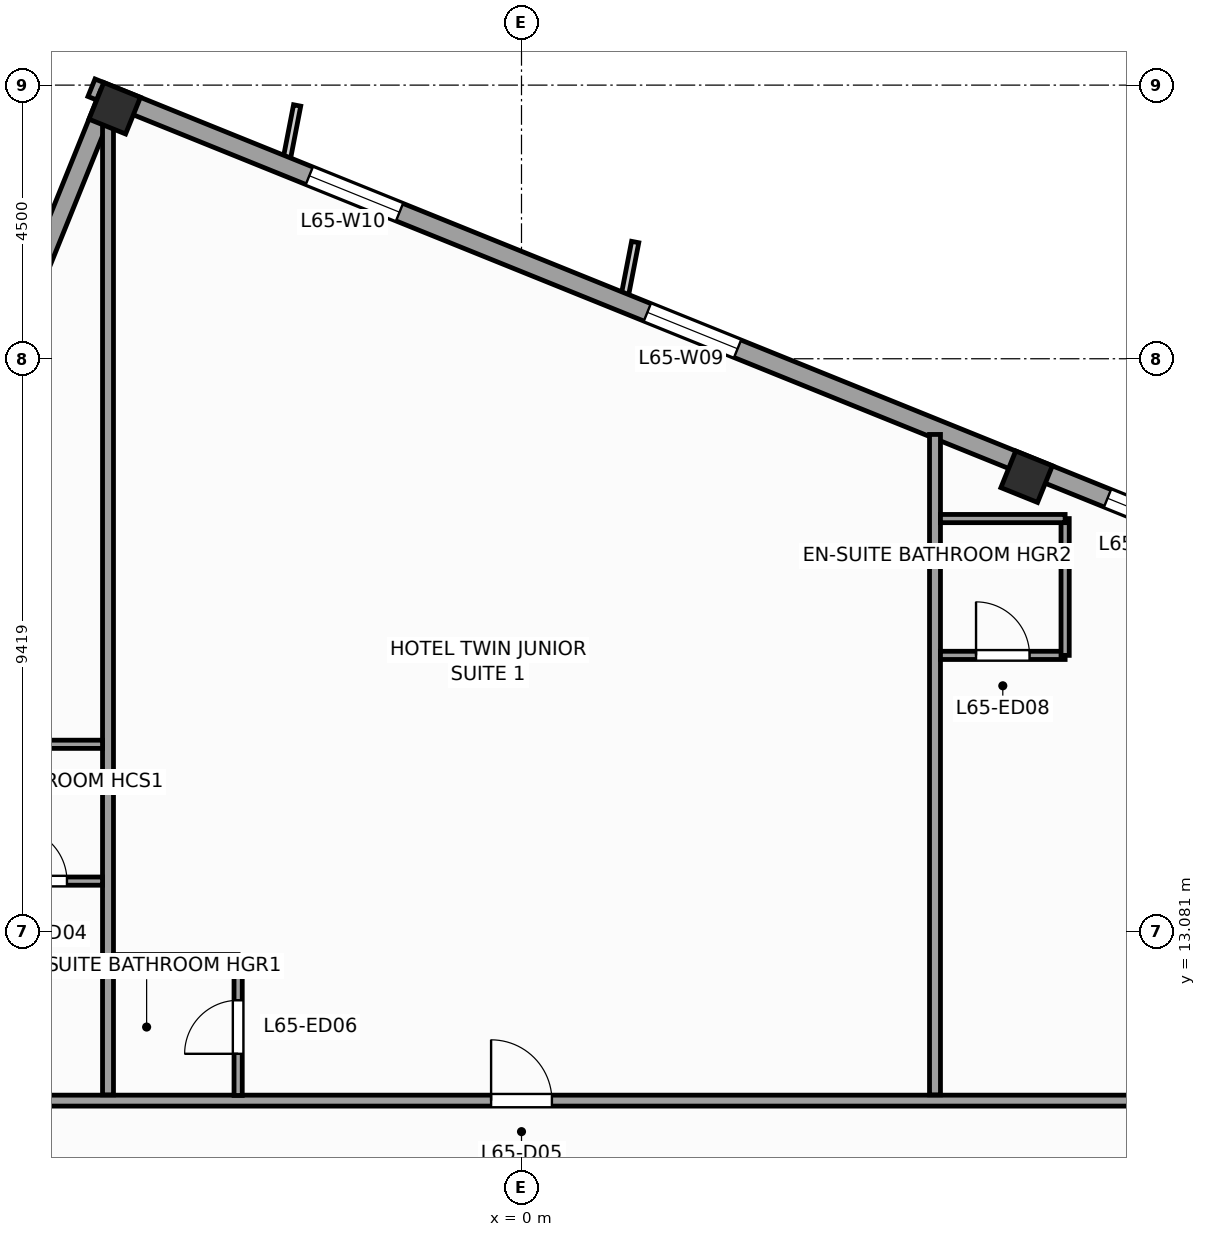
"""IFC4 building model, lengths in metres.
Left out: names, types, materials, properties, quantities, classifications, styles, units other than length and angle.
Written with IfcOpenShell. Run it as: python <this file> out.ifc"""

import sys

from ifc_helpers import new_model, si_unit, direction, frame, frame_2d, origin, origin_2d, place, context, subcontext, project, spatial, rectangle, extrude, source, transform, mapped, element, fill, save


model = new_model("IFC4")
c1 = context("Model", 3, precision=1e-05, world=origin(), true_north=direction((0.0, 1.0)))
c2 = subcontext(c1, "Body", "Model", "MODEL_VIEW")
j1 = project(units=[si_unit("LENGTHUNIT", "METRE"), si_unit("PLANEANGLEUNIT", "RADIAN")], contexts=[c1])
p1 = place(None, origin())
s1 = spatial("IfcSite", under=j1, at=p1, CompositionType="ELEMENT")
p2 = place(p1, origin())
s2 = spatial("IfcBuilding", under=s1, at=p2, CompositionType="ELEMENT")
p3 = place(p2, frame((0.0, 0.0, 268.8)))
s3 = spatial("IfcBuildingStorey", under=s2, at=p3, CompositionType="ELEMENT", Elevation=268.8)
m1 = source(origin(), c2, "Body", "SweptSolid", [
    extrude(rectangle(XDim=0.65, YDim=0.65, at=origin_2d()), origin(), (0.0, 0.0, 1.0), 3.6),
])
for number, where, z_axis, x_axis in (
    (1, (8.307, 20.56, 0.0), (0.0, 0.0, 1.0), (0.375, 0.927, 0.0)),
    (2, (-6.69, 26.62, 0.0), (0.0, 0.0, 1.0), (0.375, 0.927, 0.0)),
):
    element("IfcColumn", number, at=place(p3, frame(where, z_axis=z_axis, x_axis=x_axis)), inside=s3, PredefinedType="COLUMN", context=c2, shape_type="MappedRepresentation", body=[
        mapped(m1, transform((0.0, 0.0, 0.0), scale=1.0)),
    ])
p4 = place(p3, frame((23.813, 14.479, 0.0), z_axis=(0.0, 0.0, 1.0), x_axis=(-0.927182657188, 0.374609557019, 0.0)))
e3 = element("IfcWall", 3, at=p4, inside=s3, PredefinedType="STANDARD", context=c2, shape_type="SweptSolid", body=[
    extrude(rectangle(XDim=33.31, YDim=0.31, at=frame_2d((16.655, 0.0))), origin(), (0.0, 0.0, 1.0), 2.75),
])
p5 = place(p4, frame((3.197, 0.0, 0.47)))
e4 = element("IfcOpeningElement", 4, at=p5, cuts=e3, PredefinedType="OPENING", context=c2, shape_type="SweptSolid", body=[
    extrude(rectangle(XDim=1.6, YDim=2.1, at=frame_2d((0.8, 1.05))), frame((0.0, 0.165, 0.0), z_axis=(0.0, -1.0, 0.0), x_axis=(1.0, 0.0, 0.0)), (0.0, 0.0, 1.0), 0.33),
])
p6 = place(p4, frame((8.86, 0.0, 0.47)))
e5 = element("IfcOpeningElement", 5, at=p6, cuts=e3, PredefinedType="OPENING", context=c2, shape_type="SweptSolid", body=[
    extrude(rectangle(XDim=1.6, YDim=2.1, at=frame_2d((0.8, 1.05))), frame((0.0, 0.165, 0.0), z_axis=(0.0, -1.0, 0.0), x_axis=(1.0, 0.0, 0.0)), (0.0, 0.0, 1.0), 0.33),
])
p7 = place(p4, frame((13.689, 0.0, 0.47)))
e6 = element("IfcOpeningElement", 6, at=p7, cuts=e3, PredefinedType="OPENING", context=c2, shape_type="SweptSolid", body=[
    extrude(rectangle(XDim=1.6, YDim=2.1, at=frame_2d((0.8, 1.05))), frame((0.0, 0.165, 0.0), z_axis=(0.0, -1.0, 0.0), x_axis=(1.0, 0.0, 0.0)), (0.0, 0.0, 1.0), 0.33),
])
p8 = place(p4, frame((21.851, 0.0, 0.47)))
e7 = element("IfcOpeningElement", 7, at=p8, cuts=e3, PredefinedType="OPENING", context=c2, shape_type="SweptSolid", body=[
    extrude(rectangle(XDim=1.6, YDim=2.1, at=frame_2d((0.8, 1.05))), frame((0.0, 0.165, 0.0), z_axis=(0.0, -1.0, 0.0), x_axis=(1.0, 0.0, 0.0)), (0.0, 0.0, 1.0), 0.33),
])
p9 = place(p4, frame((27.847, 0.0, 0.47)))
e8 = element("IfcOpeningElement", 8, at=p9, cuts=e3, PredefinedType="OPENING", context=c2, shape_type="SweptSolid", body=[
    extrude(rectangle(XDim=1.6, YDim=2.1, at=frame_2d((0.8, 1.05))), frame((0.0, 0.165, 0.0), z_axis=(0.0, -1.0, 0.0), x_axis=(1.0, 0.0, 0.0)), (0.0, 0.0, 1.0), 0.33),
])
p10 = place(p3, frame((-6.784, 26.841, 0.0), z_axis=(0.0, 0.0, 1.0), x_axis=(-0.374636620962, -0.927171722085, 0.0)))
e9 = element("IfcWall", 9, at=p10, inside=s3, PredefinedType="STANDARD", context=c2, shape_type="SweptSolid", body=[
    extrude(rectangle(XDim=6.0, YDim=0.31, at=frame_2d((3.0, 0.0))), origin(), (0.0, 0.0, 1.0), 2.65),
])
p11 = place(p3, frame((-10.3, 10.3, 0.0), z_axis=(0.0, 0.0, 1.0), x_axis=(1.0, 0.0, 0.0)))
e10 = element("IfcWall", 10, at=p11, inside=s3, PredefinedType="PARTITIONING", context=c2, shape_type="SweptSolid", body=[
    extrude(rectangle(XDim=21.7, YDim=0.18, at=frame_2d((10.85, 0.0))), origin(), (0.0, 0.0, 1.0), 3.35),
])
p12 = place(p11, frame((9.8, 0.0, 0.0)))
e11 = element("IfcOpeningElement", 11, at=p12, cuts=e10, PredefinedType="OPENING", context=c2, shape_type="SweptSolid", body=[
    extrude(rectangle(XDim=1.0, YDim=2.15, at=frame_2d((0.5, 1.075))), frame((0.0, 0.1, 0.0), z_axis=(0.0, -1.0, 0.0), x_axis=(1.0, 0.0, 0.0)), (0.0, 0.0, 1.0), 0.2),
])
p13 = place(p3, frame((-6.8, 10.395, 0.0), z_axis=(0.0, 0.0, 1.0), x_axis=(0.0, 1.0, 0.0)))
e12 = element("IfcWall", 12, at=p13, inside=s3, PredefinedType="PARTITIONING", context=c2, shape_type="SweptSolid", body=[
    extrude(rectangle(XDim=16.167, YDim=0.18, at=frame_2d((8.083, 0.0))), origin(), (0.0, 0.0, 1.0), 3.35),
])
p14 = place(p3, frame((6.8, 10.395, 0.0), z_axis=(0.0, 0.0, 1.0), x_axis=(0.0, 1.0, 0.0)))
e13 = element("IfcWall", 13, at=p14, inside=s3, PredefinedType="PARTITIONING", context=c2, shape_type="SweptSolid", body=[
    extrude(rectangle(XDim=10.86, YDim=0.18, at=frame_2d((5.43, 0.0))), origin(), (0.0, 0.0, 1.0), 3.35),
])
p15 = place(p3, frame((-8.94, 13.91, 0.0), z_axis=(0.0, 0.0, 1.0), x_axis=(1.0, 0.0, 0.0)))
e14 = element("IfcWall", 14, at=p15, inside=s3, PredefinedType="PARTITIONING", context=c2, shape_type="SweptSolid", body=[
    extrude(rectangle(XDim=2.05, YDim=0.135, at=frame_2d((1.025, 0.0))), origin(), (0.0, 0.0, 1.0), 3.35),
])
p16 = place(p15, frame((0.585, 0.0, 0.0)))
e15 = element("IfcOpeningElement", 15, at=p16, cuts=e14, PredefinedType="OPENING", context=c2, shape_type="SweptSolid", body=[
    extrude(rectangle(XDim=0.88, YDim=2.1, at=frame_2d((0.44, 1.05))), frame((0.0, 0.078, 0.0), z_axis=(0.0, -1.0, 0.0), x_axis=(1.0, 0.0, 0.0)), (0.0, 0.0, 1.0), 0.155),
])
p17 = place(p3, frame((-8.94, 16.16, 0.0), z_axis=(0.0, 0.0, 1.0), x_axis=(1.0, 0.0, 0.0)))
e16 = element("IfcWall", 16, at=p17, inside=s3, PredefinedType="PARTITIONING", context=c2, shape_type="SweptSolid", body=[
    extrude(rectangle(XDim=2.05, YDim=0.135, at=frame_2d((1.025, 0.0))), origin(), (0.0, 0.0, 1.0), 3.35),
])
p18 = place(p3, frame((-4.66, 10.385, 0.0), z_axis=(0.0, 0.0, 1.0), x_axis=(0.0, 1.0, 0.0)))
e17 = element("IfcWall", 17, at=p18, inside=s3, PredefinedType="PARTITIONING", context=c2, shape_type="SweptSolid", body=[
    extrude(rectangle(XDim=2.25, YDim=0.135, at=frame_2d((1.125, 0.0))), origin(), (0.0, 0.0, 1.0), 3.35),
])
p19 = place(p18, frame((0.685, 0.0, 0.0)))
e18 = element("IfcOpeningElement", 18, at=p19, cuts=e17, PredefinedType="OPENING", context=c2, shape_type="SweptSolid", body=[
    extrude(rectangle(XDim=0.88, YDim=2.1, at=frame_2d((0.44, 1.05))), frame((0.0, 0.078, 0.0), z_axis=(0.0, -1.0, 0.0), x_axis=(1.0, 0.0, 0.0)), (0.0, 0.0, 1.0), 0.155),
])
p20 = place(p3, frame((-6.71, 12.635, 0.0), z_axis=(0.0, 0.0, 1.0), x_axis=(1.0, 0.0, 0.0)))
e19 = element("IfcWall", 19, at=p20, inside=s3, PredefinedType="PARTITIONING", context=c2, shape_type="SweptSolid", body=[
    extrude(rectangle(XDim=2.05, YDim=0.135, at=frame_2d((1.025, 0.0))), origin(), (0.0, 0.0, 1.0), 3.35),
])
p21 = place(p3, frame((6.89, 17.622, 0.0), z_axis=(0.0, 0.0, 1.0), x_axis=(1.0, 0.0, 0.0)))
e20 = element("IfcWall", 20, at=p21, inside=s3, PredefinedType="PARTITIONING", context=c2, shape_type="SweptSolid", body=[
    extrude(rectangle(XDim=2.05, YDim=0.135, at=frame_2d((1.025, 0.0))), origin(), (0.0, 0.0, 1.0), 2.95),
])
p22 = place(p21, frame((0.585, 0.0, 0.0)))
e21 = element("IfcOpeningElement", 21, at=p22, cuts=e20, PredefinedType="OPENING", context=c2, shape_type="SweptSolid", body=[
    extrude(rectangle(XDim=0.88, YDim=2.1, at=frame_2d((0.44, 1.05))), frame((0.0, 0.078, 0.0), z_axis=(0.0, -1.0, 0.0), x_axis=(1.0, 0.0, 0.0)), (0.0, 0.0, 1.0), 0.155),
])
p23 = place(p3, frame((8.94, 17.622, 0.0), z_axis=(0.0, 0.0, 1.0), x_axis=(0.0, 1.0, 0.0)))
e22 = element("IfcWall", 22, at=p23, inside=s3, PredefinedType="PARTITIONING", context=c2, shape_type="SweptSolid", body=[
    extrude(rectangle(XDim=2.25, YDim=0.135, at=frame_2d((1.125, 0.0))), origin(), (0.0, 0.0, 1.0), 3.35),
])
p24 = place(p3, frame((6.89, 19.872, 0.0), z_axis=(0.0, 0.0, 1.0), x_axis=(1.0, 0.0, 0.0)))
e23 = element("IfcWall", 23, at=p24, inside=s3, PredefinedType="PARTITIONING", context=c2, shape_type="SweptSolid", body=[
    extrude(rectangle(XDim=2.05, YDim=0.135, at=frame_2d((1.025, 0.0))), origin(), (0.0, 0.0, 1.0), 3.35),
])
m2 = source(origin(), c2, "Body", "SweptSolid", [
    extrude(rectangle(XDim=1.6, YDim=2.1, at=frame_2d((0.8, 1.05))), frame((0.0, 0.03, 0.0), z_axis=(0.0, -1.0, 0.0), x_axis=(1.0, 0.0, 0.0)), (0.0, 0.0, 1.0), 0.06),
])
p25 = place(p7, origin())
e24 = element("IfcWindow", 24, at=p25, inside=s3, PartitioningType="SINGLE_PANEL", PredefinedType="WINDOW", context=c2, shape_type="MappedRepresentation", body=[
    mapped(m2, transform((0.0, 0.0, 0.0), scale=1.0)),
])
fill(e6, e24)
p26 = place(p8, origin())
e25 = element("IfcWindow", 25, at=p26, inside=s3, PartitioningType="SINGLE_PANEL", PredefinedType="WINDOW", context=c2, shape_type="MappedRepresentation", body=[
    mapped(m2, transform((0.0, 0.0, 0.0), scale=1.0)),
])
fill(e7, e25)
p27 = place(p9, origin())
e26 = element("IfcWindow", 26, at=p27, inside=s3, PartitioningType="SINGLE_PANEL", PredefinedType="WINDOW", context=c2, shape_type="MappedRepresentation", body=[
    mapped(m2, transform((0.0, 0.0, 0.0), scale=1.0)),
])
fill(e8, e26)
m3 = source(origin(), c2, "Body", "SweptSolid", [
    extrude(rectangle(XDim=0.88, YDim=2.1, at=frame_2d((0.44, 1.05))), frame((0.0, 0.025, 0.0), z_axis=(0.0, -1.0, 0.0), x_axis=(1.0, 0.0, 0.0)), (0.0, 0.0, 1.0), 0.05),
])
p28 = place(p16, origin())
e27 = element("IfcDoor", 27, at=p28, inside=s3, OperationType="SINGLE_SWING_LEFT", PredefinedType="DOOR", context=c2, shape_type="MappedRepresentation", body=[
    mapped(m3, transform((0.0, 0.0, 0.0), scale=1.0)),
])
fill(e15, e27)
m4 = source(origin(), c2, "Body", "SweptSolid", [
    extrude(rectangle(XDim=1.0, YDim=2.15, at=frame_2d((0.5, 1.075))), frame((0.0, 0.025, 0.0), z_axis=(0.0, -1.0, 0.0), x_axis=(1.0, 0.0, 0.0)), (0.0, 0.0, 1.0), 0.05),
])
p29 = place(p12, origin())
e28 = element("IfcDoor", 28, at=p29, inside=s3, OperationType="SINGLE_SWING_LEFT", PredefinedType="DOOR", context=c2, shape_type="MappedRepresentation", body=[
    mapped(m4, transform((0.0, 0.0, 0.0), scale=1.0)),
])
fill(e11, e28)
p30 = place(p19, origin())
e29 = element("IfcDoor", 29, at=p30, inside=s3, OperationType="SINGLE_SWING_LEFT", PredefinedType="DOOR", context=c2, shape_type="MappedRepresentation", body=[
    mapped(m3, transform((0.0, 0.0, 0.0), scale=1.0)),
])
fill(e18, e29)
p31 = place(p22, origin())
e30 = element("IfcDoor", 30, at=p31, inside=s3, OperationType="SINGLE_SWING_LEFT", PredefinedType="DOOR", context=c2, shape_type="MappedRepresentation", body=[
    mapped(m3, transform((0.0, 0.0, 0.0), scale=1.0)),
])
fill(e21, e30)
save(model, sys.argv[1])
